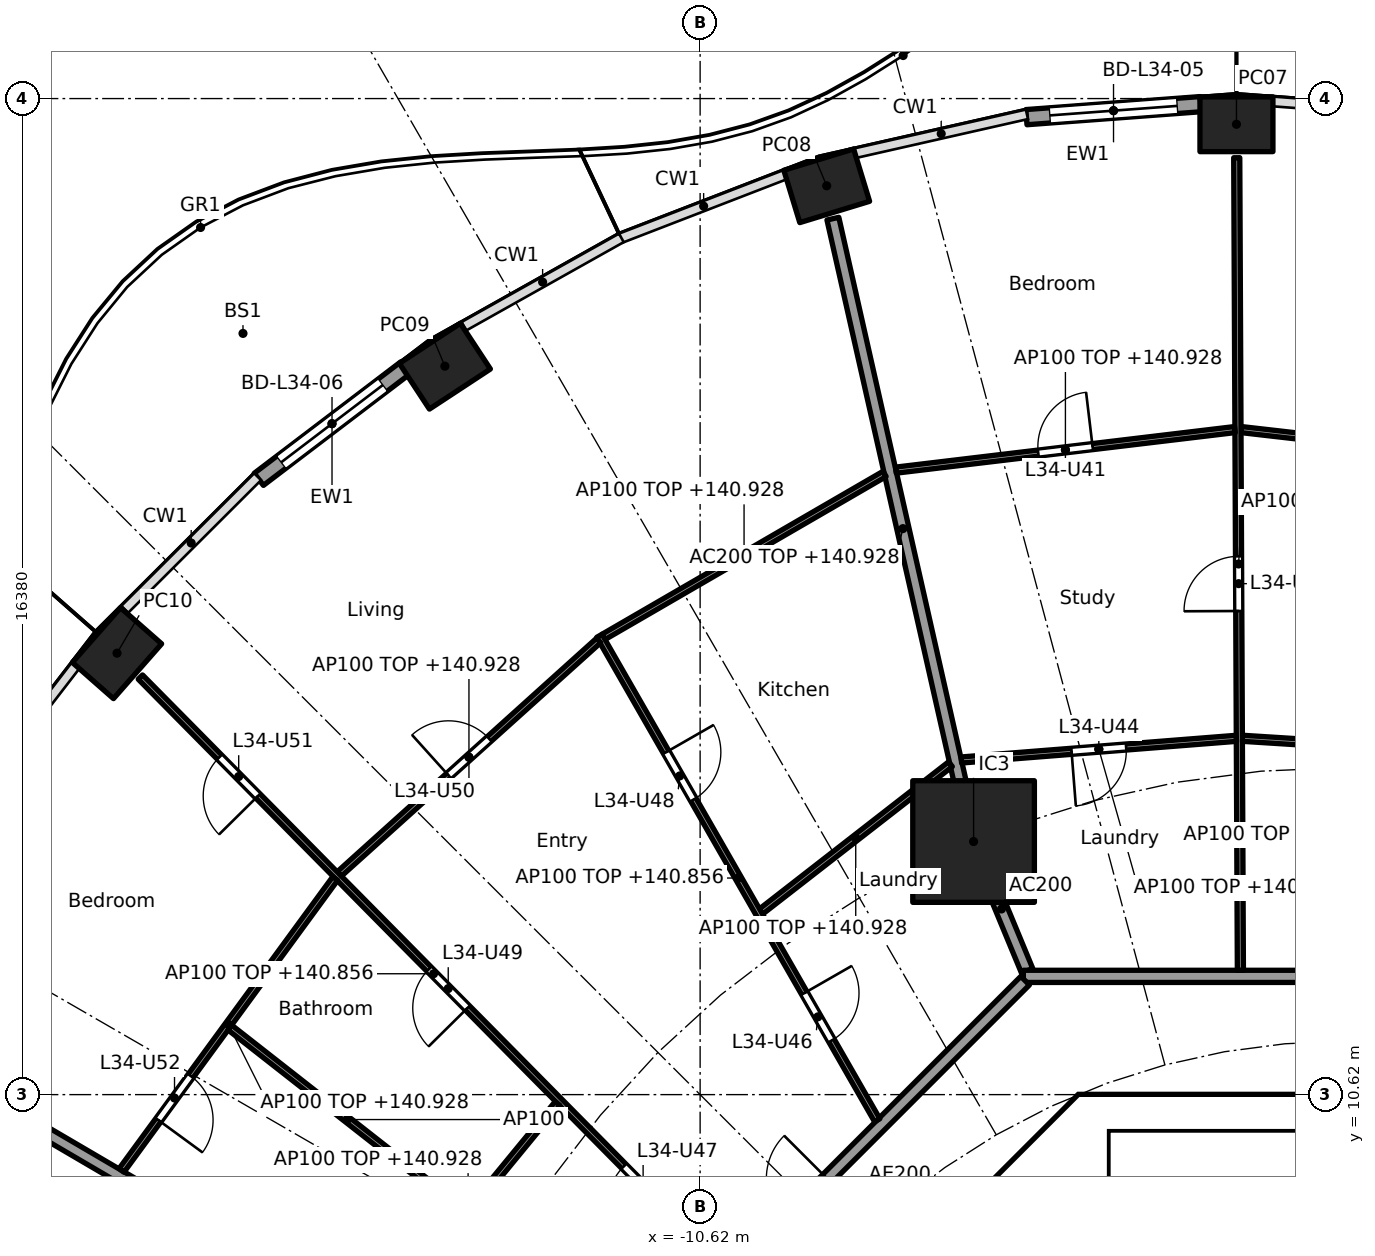
"""IFC4 building model, lengths in metres.
Left out: names, types, materials, properties, quantities, classifications, styles, units other than length and angle.
Written with IfcOpenShell. Run it as: python <this file> out.ifc"""

import sys

from ifc_helpers import new_model, si_unit, direction, frame, frame_2d, origin, origin_2d, place, context, subcontext, project, spatial, polyline, rectangle, hollow_rectangle, outline, extrude, element, fill, save


model = new_model("IFC4")
c1 = context("Model", 3, precision=1e-05, world=origin(), true_north=direction((0.0, 1.0)))
c2 = subcontext(c1, "Body", "Model", "MODEL_VIEW")
j1 = project(units=[si_unit("LENGTHUNIT", "METRE"), si_unit("PLANEANGLEUNIT", "RADIAN")], contexts=[c1])
p1 = place(None, origin())
s1 = spatial("IfcSite", under=j1, at=p1, CompositionType="ELEMENT")
p2 = place(p1, origin())
s2 = spatial("IfcBuilding", under=s1, at=p2, CompositionType="ELEMENT")
p3 = place(p2, frame((0.0, 0.0, 138.1)))
s3 = spatial("IfcBuildingStorey", under=s2, at=p3, CompositionType="ELEMENT", Elevation=138.1)
for number, where, z_axis, x_axis in (
    (1, (-1.8, 26.577, 0.0), (0.0, 0.0, 1.0), (-1.0, 0.0, 0.0)),
    (2, (-8.538, 25.565, 0.0), (0.0, 0.0, 1.0), (-0.957, -0.292, 0.0)),
    (3, (-14.817, 22.599, 0.0), (0.0, 0.0, 1.0), (-0.836, -0.549, 0.0)),
    (4, (-20.209, 17.88, 0.0), (0.0, 0.0, 1.0), (-0.66, -0.751, 0.0)),
):
    element("IfcColumn", number, at=place(p3, frame(where, z_axis=z_axis, x_axis=x_axis)), inside=s3, PredefinedType="COLUMN", context=c2, shape_type="SweptSolid", body=[
        extrude(hollow_rectangle(XDim=1.2, YDim=0.9, WallThickness=0.04, at=origin_2d()), origin(), (0.0, 0.0, 1.0), 3.7),
    ])
p4 = place(p3, frame((-6.123, 14.782, 0.0), z_axis=(0.0, 0.0, 1.0), x_axis=(1.0, 0.0, 0.0)))
e5 = element("IfcColumn", 5, at=p4, inside=s3, PredefinedType="COLUMN", context=c2, shape_type="SweptSolid", body=[
    extrude(rectangle(XDim=2.0, YDim=2.0, at=origin_2d()), origin(), (0.0, 0.0, 1.0), 3.7),
])
p5 = place(p3, frame((-5.254, 26.694, 0.0), z_axis=(0.0, 0.0, 1.0), x_axis=(0.997231697044, 0.074356858535, 0.0)))
e6 = element("IfcWall", 6, at=p5, inside=s3, PredefinedType="SOLIDWALL", context=c2, shape_type="SweptSolid", body=[
    extrude(rectangle(XDim=2.873, YDim=0.25, at=frame_2d((1.437, 0.0))), origin(), (0.0, 0.0, 1.0), 3.44),
])
p6 = place(p5, frame((0.386, 0.0, 0.0)))
e7 = element("IfcOpeningElement", 7, at=p6, cuts=e6, PredefinedType="OPENING", context=c2, shape_type="SweptSolid", body=[
    extrude(rectangle(XDim=2.1, YDim=2.4, at=frame_2d((1.05, 1.2))), frame((0.0, 0.135, 0.0), z_axis=(0.0, -1.0, 0.0), x_axis=(1.0, 0.0, 0.0)), (0.0, 0.0, 1.0), 0.27),
])
p7 = place(p3, frame((-17.878, 20.738, 0.0), z_axis=(0.0, 0.0, 1.0), x_axis=(0.796022231079, 0.605267385233, 0.0)))
e8 = element("IfcWall", 8, at=p7, inside=s3, PredefinedType="SOLIDWALL", context=c2, shape_type="SweptSolid", body=[
    extrude(rectangle(XDim=3.026, YDim=0.25, at=frame_2d((1.513, 0.0))), origin(), (0.0, 0.0, 1.0), 3.44),
])
p8 = place(p7, frame((0.463, 0.0, 0.0)))
e9 = element("IfcOpeningElement", 9, at=p8, cuts=e8, PredefinedType="OPENING", context=c2, shape_type="SweptSolid", body=[
    extrude(rectangle(XDim=2.1, YDim=2.4, at=frame_2d((1.05, 1.2))), frame((0.0, 0.135, 0.0), z_axis=(0.0, -1.0, 0.0), x_axis=(1.0, 0.0, 0.0)), (0.0, 0.0, 1.0), 0.27),
])
p9 = place(p3, frame((-4.613, 9.988, 0.0), z_axis=(0.0, 0.0, 1.0), x_axis=(-0.707106781187, -0.707106781187, 0.0)))
e10 = element("IfcWall", 10, at=p9, inside=s3, PredefinedType="SHEAR", context=c2, shape_type="SweptSolid", body=[
    extrude(rectangle(XDim=7.602, YDim=0.6, at=frame_2d((3.801, 0.0))), origin(), (0.0, 0.0, 1.0), 3.44),
])
p10 = place(p9, frame((0.351, 0.0, 0.0)))
e11 = element("IfcOpeningElement", 11, at=p10, cuts=e10, PredefinedType="OPENING", context=c2, shape_type="SweptSolid", body=[
    extrude(rectangle(XDim=1.1, YDim=2.1, at=frame_2d((0.55, 1.05))), frame((0.0, 0.31, 0.0), z_axis=(0.0, -1.0, 0.0), x_axis=(1.0, 0.0, 0.0)), (0.0, 0.0, 1.0), 0.62),
])
p11 = place(p3, origin())
e12 = element("IfcWall", 12, at=p11, inside=s3, PredefinedType="SHEAR", context=c2, shape_type="SweptSolid", body=[
    extrude(outline(polyline([(-4.152, 10.025), (-4.401, 9.776), (-4.825, 10.2), (-4.401, 10.625), (4.401, 10.625), (4.825, 10.2), (4.401, 9.776), (4.152, 10.025), (-4.152, 10.025)])), origin(), (0.0, 0.0, 1.0), 3.44),
])
p12 = place(p3, origin())
e13 = element("IfcWall", 13, at=p12, inside=s3, PredefinedType="SOLIDWALL", context=c2, shape_type="SweptSolid", body=[
    extrude(outline(polyline([(-3.9, 7.025), (-4.1, 7.025), (-4.1, 10.025), (-3.9, 10.025), (-3.9, 7.025)])), origin(), (0.0, 0.0, 1.0), 3.44),
])
p13 = place(p3, frame((-5.243, 12.657, 0.0), z_axis=(0.0, 0.0, 1.0), x_axis=(-0.38273085373, 0.923859888513, 0.0)))
e14 = element("IfcWall", 14, at=p13, inside=s3, PredefinedType="PARTITIONING", context=c2, shape_type="SweptSolid", body=[
    extrude(rectangle(XDim=2.199, YDim=0.2, at=frame_2d((1.1, 0.0))), origin(), (0.0, 0.0, 1.0), 3.44),
])
p14 = place(p3, frame((-6.134, 14.831, 0.0), z_axis=(0.0, 0.0, 1.0), x_axis=(-0.220337590808, 0.975423675167, 0.0)))
e15 = element("IfcWall", 15, at=p14, inside=s3, PredefinedType="PARTITIONING", context=c2, shape_type="SweptSolid", body=[
    extrude(rectangle(XDim=10.451, YDim=0.2, at=frame_2d((5.226, 0.0))), origin(), (0.0, 0.0, 1.0), 2.828),
])
p15 = place(p3, frame((-14.825, 6.148, 0.0), z_axis=(0.0, 0.0, 1.0), x_axis=(-0.862852031662, 0.505456597006, 0.0)))
e16 = element("IfcWall", 16, at=p15, inside=s3, PredefinedType="PARTITIONING", context=c2, shape_type="SweptSolid", body=[
    extrude(rectangle(XDim=10.487, YDim=0.2, at=frame_2d((5.244, 0.0))), origin(), (0.0, 0.0, 1.0), 2.828),
])
p16 = place(p3, frame((5.104, 12.565, 0.0), z_axis=(0.0, 0.0, 1.0), x_axis=(-1.0, 0.0, 0.0)))
e17 = element("IfcWall", 17, at=p16, inside=s3, PredefinedType="PARTITIONING", context=c2, shape_type="SweptSolid", body=[
    extrude(rectangle(XDim=10.409, YDim=0.2, at=frame_2d((5.205, 0.0))), origin(), (0.0, 0.0, 1.0), 3.44),
])
p17 = place(p3, frame((-5.275, 12.494, 0.0), z_axis=(0.0, 0.0, 1.0), x_axis=(-0.707106781187, -0.707106781187, 0.0)))
e18 = element("IfcWall", 18, at=p17, inside=s3, PredefinedType="PARTITIONING", context=c2, shape_type="SweptSolid", body=[
    extrude(rectangle(XDim=10.209, YDim=0.2, at=frame_2d((5.104, 0.0))), origin(), (0.0, 0.0, 1.0), 3.44),
])
p18 = place(p17, frame((4.604, 0.0, 0.0)))
e19 = element("IfcOpeningElement", 19, at=p18, cuts=e18, PredefinedType="OPENING", context=c2, shape_type="SweptSolid", body=[
    extrude(rectangle(XDim=1.0, YDim=2.1, at=frame_2d((0.5, 1.05))), frame((0.0, 0.11, 0.0), z_axis=(0.0, -1.0, 0.0), x_axis=(1.0, 0.0, 0.0)), (0.0, 0.0, 1.0), 0.22),
])
p19 = place(p3, frame((2.685, 16.202, 0.0), z_axis=(0.0, 0.0, 1.0), x_axis=(-0.998000808042, 0.063201164138, 0.0)))
e20 = element("IfcWall", 20, at=p19, inside=s3, PredefinedType="PARTITIONING", context=c2, shape_type="SweptSolid", body=[
    extrude(rectangle(XDim=4.396, YDim=0.1, at=frame_2d((2.198, 0.0))), origin(), (0.0, 0.0, 1.0), 2.828),
])
p20 = place(p19, frame((1.773, 0.0, 0.0)))
e21 = element("IfcOpeningElement", 21, at=p20, cuts=e20, PredefinedType="OPENING", context=c2, shape_type="SweptSolid", body=[
    extrude(rectangle(XDim=0.9, YDim=2.1, at=frame_2d((0.45, 1.05))), frame((0.0, 0.06, 0.0), z_axis=(0.0, -1.0, 0.0), x_axis=(1.0, 0.0, 0.0)), (0.0, 0.0, 1.0), 0.12),
])
p21 = place(p3, frame((3.851, 20.919, 0.0), z_axis=(0.0, 0.0, 1.0), x_axis=(-0.993519908136, 0.11365822512, 0.0)))
e22 = element("IfcWall", 22, at=p21, inside=s3, PredefinedType="PARTITIONING", context=c2, shape_type="SweptSolid", body=[
    extrude(rectangle(XDim=5.613, YDim=0.1, at=frame_2d((2.806, 0.0))), origin(), (0.0, 0.0, 1.0), 2.828),
])
p22 = place(p3, frame((-1.735, 12.665, 0.0), z_axis=(0.0, 0.0, 1.0), x_axis=(-0.004494500855, 0.99998989968, 0.0)))
e23 = element("IfcWall", 23, at=p22, inside=s3, PredefinedType="PARTITIONING", context=c2, shape_type="SweptSolid", body=[
    extrude(rectangle(XDim=13.363, YDim=0.1, at=frame_2d((6.681, 0.0))), origin(), (0.0, 0.0, 1.0), 2.756),
])
p23 = place(p22, frame((5.908, 0.0, 0.0)))
e24 = element("IfcOpeningElement", 24, at=p23, cuts=e23, PredefinedType="OPENING", context=c2, shape_type="SweptSolid", body=[
    extrude(rectangle(XDim=0.9, YDim=2.1, at=frame_2d((0.45, 1.05))), frame((0.0, 0.06, 0.0), z_axis=(0.0, -1.0, 0.0), x_axis=(1.0, 0.0, 0.0)), (0.0, 0.0, 1.0), 0.12),
])
p24 = place(p3, frame((-1.802, 16.479, 0.0), z_axis=(0.0, 0.0, 1.0), x_axis=(-0.996907698294, -0.078581429625, 0.0)))
e25 = element("IfcWall", 25, at=p24, inside=s3, PredefinedType="PARTITIONING", context=c2, shape_type="SweptSolid", body=[
    extrude(rectangle(XDim=4.536, YDim=0.1, at=frame_2d((2.268, 0.0))), origin(), (0.0, 0.0, 1.0), 2.828),
])
p25 = place(p24, frame((1.818, 0.0, 0.0)))
e26 = element("IfcOpeningElement", 26, at=p25, cuts=e25, PredefinedType="OPENING", context=c2, shape_type="SweptSolid", body=[
    extrude(rectangle(XDim=0.9, YDim=2.1, at=frame_2d((0.45, 1.05))), frame((0.0, 0.06, 0.0), z_axis=(0.0, -1.0, 0.0), x_axis=(1.0, 0.0, 0.0)), (0.0, 0.0, 1.0), 0.12),
])
p26 = place(p3, frame((-1.825, 21.557, 0.0), z_axis=(0.0, 0.0, 1.0), x_axis=(-0.992915053711, -0.11882632753, 0.0)))
e27 = element("IfcWall", 27, at=p26, inside=s3, PredefinedType="PARTITIONING", context=c2, shape_type="SweptSolid", body=[
    extrude(rectangle(XDim=5.615, YDim=0.1, at=frame_2d((2.808, 0.0))), origin(), (0.0, 0.0, 1.0), 2.828),
])
p27 = place(p26, frame((2.358, 0.0, 0.0)))
e28 = element("IfcOpeningElement", 28, at=p27, cuts=e27, PredefinedType="OPENING", context=c2, shape_type="SweptSolid", body=[
    extrude(rectangle(XDim=0.9, YDim=2.1, at=frame_2d((0.45, 1.05))), frame((0.0, 0.06, 0.0), z_axis=(0.0, -1.0, 0.0), x_axis=(1.0, 0.0, 0.0)), (0.0, 0.0, 1.0), 0.12),
])
p28 = place(p3, frame((-6.503, 16.054, 0.0), z_axis=(0.0, 0.0, 1.0), x_axis=(-0.789428807693, -0.613842127574, 0.0)))
e29 = element("IfcWall", 29, at=p28, inside=s3, PredefinedType="PARTITIONING", context=c2, shape_type="SweptSolid", body=[
    extrude(rectangle(XDim=3.948, YDim=0.1, at=frame_2d((1.974, 0.0))), origin(), (0.0, 0.0, 1.0), 2.828),
])
p29 = place(p3, frame((-7.586, 20.827, 0.0), z_axis=(0.0, 0.0, 1.0), x_axis=(-0.865093450578, -0.501610727325, 0.0)))
e30 = element("IfcWall", 30, at=p29, inside=s3, PredefinedType="PARTITIONING", context=c2, shape_type="SweptSolid", body=[
    extrude(rectangle(XDim=5.343, YDim=0.1, at=frame_2d((2.671, 0.0))), origin(), (0.0, 0.0, 1.0), 2.828),
])
p30 = place(p3, frame((-7.708, 10.198, 0.0), z_axis=(0.0, 0.0, 1.0), x_axis=(-0.497449462689, 0.867492957937, 0.0)))
e31 = element("IfcWall", 31, at=p30, inside=s3, PredefinedType="PARTITIONING", context=c2, shape_type="SweptSolid", body=[
    extrude(rectangle(XDim=9.185, YDim=0.1, at=frame_2d((4.592, 0.0))), origin(), (0.0, 0.0, 1.0), 2.756),
])
p31 = place(p30, frame((1.511, 0.0, 0.0)))
e32 = element("IfcOpeningElement", 32, at=p31, cuts=e31, PredefinedType="OPENING", context=c2, shape_type="SweptSolid", body=[
    extrude(rectangle(XDim=0.9, YDim=2.1, at=frame_2d((0.45, 1.05))), frame((0.0, 0.06, 0.0), z_axis=(0.0, -1.0, 0.0), x_axis=(1.0, 0.0, 0.0)), (0.0, 0.0, 1.0), 0.12),
])
p32 = place(p30, frame((6.078, 0.0, 0.0)))
e33 = element("IfcOpeningElement", 33, at=p32, cuts=e31, PredefinedType="OPENING", context=c2, shape_type="SweptSolid", body=[
    extrude(rectangle(XDim=0.9, YDim=2.1, at=frame_2d((0.45, 1.05))), frame((0.0, 0.06, 0.0), z_axis=(0.0, -1.0, 0.0), x_axis=(1.0, 0.0, 0.0)), (0.0, 0.0, 1.0), 0.12),
])
p33 = place(p3, frame((-12.289, 18.089, 0.0), z_axis=(0.0, 0.0, 1.0), x_axis=(-0.743146066164, -0.669129228435, 0.0)))
e34 = element("IfcWall", 34, at=p33, inside=s3, PredefinedType="PARTITIONING", context=c2, shape_type="SweptSolid", body=[
    extrude(rectangle(XDim=5.739, YDim=0.1, at=frame_2d((2.87, 0.0))), origin(), (0.0, 0.0, 1.0), 2.828),
])
p34 = place(p33, frame((2.42, 0.0, 0.0)))
e35 = element("IfcOpeningElement", 35, at=p34, cuts=e34, PredefinedType="OPENING", context=c2, shape_type="SweptSolid", body=[
    extrude(rectangle(XDim=0.9, YDim=2.1, at=frame_2d((0.45, 1.05))), frame((0.0, 0.06, 0.0), z_axis=(0.0, -1.0, 0.0), x_axis=(1.0, 0.0, 0.0)), (0.0, 0.0, 1.0), 0.12),
])
p35 = place(p3, frame((-10.182, 7.729, 0.0), z_axis=(0.0, 0.0, 1.0), x_axis=(-0.702930219229, 0.7112588185, 0.0)))
e36 = element("IfcWall", 36, at=p35, inside=s3, PredefinedType="PARTITIONING", context=c2, shape_type="SweptSolid", body=[
    extrude(rectangle(XDim=13.719, YDim=0.1, at=frame_2d((6.859, 0.0))), origin(), (0.0, 0.0, 1.0), 2.756),
])
p36 = place(p35, frame((1.507, 0.0, 0.0)))
e37 = element("IfcOpeningElement", 37, at=p36, cuts=e36, PredefinedType="OPENING", context=c2, shape_type="SweptSolid", body=[
    extrude(rectangle(XDim=0.9, YDim=2.1, at=frame_2d((0.45, 1.05))), frame((0.0, 0.06, 0.0), z_axis=(0.0, -1.0, 0.0), x_axis=(1.0, 0.0, 0.0)), (0.0, 0.0, 1.0), 0.12),
])
p37 = place(p35, frame((6.067, 0.0, 0.0)))
e38 = element("IfcOpeningElement", 38, at=p37, cuts=e36, PredefinedType="OPENING", context=c2, shape_type="SweptSolid", body=[
    extrude(rectangle(XDim=0.9, YDim=2.1, at=frame_2d((0.45, 1.05))), frame((0.0, 0.06, 0.0), z_axis=(0.0, -1.0, 0.0), x_axis=(1.0, 0.0, 0.0)), (0.0, 0.0, 1.0), 0.12),
])
p38 = place(p35, frame((10.969, 0.0, 0.0)))
e39 = element("IfcOpeningElement", 39, at=p38, cuts=e36, PredefinedType="OPENING", context=c2, shape_type="SweptSolid", body=[
    extrude(rectangle(XDim=0.9, YDim=2.1, at=frame_2d((0.45, 1.05))), frame((0.0, 0.06, 0.0), z_axis=(0.0, -1.0, 0.0), x_axis=(1.0, 0.0, 0.0)), (0.0, 0.0, 1.0), 0.12),
])
p39 = place(p3, frame((-12.965, 10.475, 0.0), z_axis=(0.0, 0.0, 1.0), x_axis=(-0.634943961338, -0.772558195841, 0.0)))
e40 = element("IfcWall", 40, at=p39, inside=s3, PredefinedType="PARTITIONING", context=c2, shape_type="SweptSolid", body=[
    extrude(rectangle(XDim=4.632, YDim=0.1, at=frame_2d((2.316, 0.0))), origin(), (0.0, 0.0, 1.0), 2.828),
])
p40 = place(p3, frame((-16.621, 14.174, 0.0), z_axis=(0.0, 0.0, 1.0), x_axis=(-0.590674917338, -0.806909624449, 0.0)))
e41 = element("IfcWall", 41, at=p40, inside=s3, PredefinedType="PARTITIONING", context=c2, shape_type="SweptSolid", body=[
    extrude(rectangle(XDim=5.949, YDim=0.1, at=frame_2d((2.975, 0.0))), origin(), (0.0, 0.0, 1.0), 2.828),
])
p41 = place(p40, frame((4.024, 0.0, 0.0)))
e42 = element("IfcOpeningElement", 42, at=p41, cuts=e41, PredefinedType="OPENING", context=c2, shape_type="SweptSolid", body=[
    extrude(rectangle(XDim=0.9, YDim=2.1, at=frame_2d((0.45, 1.05))), frame((0.0, 0.06, 0.0), z_axis=(0.0, -1.0, 0.0), x_axis=(1.0, 0.0, 0.0)), (0.0, 0.0, 1.0), 0.12),
])
p42 = place(p3, frame((-14.491, 8.697, 0.0), z_axis=(0.0, 0.0, 1.0), x_axis=(-0.787139479951, 0.616775031193, 0.0)))
e43 = element("IfcWall", 43, at=p42, inside=s3, PredefinedType="PARTITIONING", context=c2, shape_type="SweptSolid", body=[
    extrude(rectangle(XDim=4.907, YDim=0.1, at=frame_2d((2.453, 0.0))), origin(), (0.0, 0.0, 1.0), 3.44),
])
p43 = place(p6, origin())
e44 = element("IfcDoor", 44, at=p43, inside=s3, OperationType="SLIDING_TO_LEFT", PredefinedType="DOOR", context=c2, shape_type="SweptSolid", body=[
    extrude(rectangle(XDim=2.1, YDim=2.4, at=frame_2d((1.05, 1.2))), frame((0.0, 0.025, 0.0), z_axis=(0.0, -1.0, 0.0), x_axis=(1.0, 0.0, 0.0)), (0.0, 0.0, 1.0), 0.05),
])
fill(e7, e44)
p44 = place(p8, origin())
e45 = element("IfcDoor", 45, at=p44, inside=s3, OperationType="SLIDING_TO_LEFT", PredefinedType="DOOR", context=c2, shape_type="SweptSolid", body=[
    extrude(rectangle(XDim=2.1, YDim=2.4, at=frame_2d((1.05, 1.2))), frame((0.0, 0.025, 0.0), z_axis=(0.0, -1.0, 0.0), x_axis=(1.0, 0.0, 0.0)), (0.0, 0.0, 1.0), 0.05),
])
fill(e9, e45)
p45 = place(p10, origin())
e46 = element("IfcDoor", 46, at=p45, inside=s3, OperationType="SINGLE_SWING_RIGHT", PredefinedType="DOOR", context=c2, shape_type="SweptSolid", body=[
    extrude(rectangle(XDim=1.1, YDim=2.1, at=frame_2d((0.55, 1.05))), frame((0.0, 0.025, 0.0), z_axis=(0.0, -1.0, 0.0), x_axis=(1.0, 0.0, 0.0)), (0.0, 0.0, 1.0), 0.05),
])
fill(e11, e46)
p46 = place(p23, origin())
e47 = element("IfcDoor", 47, at=p46, inside=s3, OperationType="SINGLE_SWING_LEFT", PredefinedType="DOOR", context=c2, shape_type="SweptSolid", body=[
    extrude(rectangle(XDim=0.9, YDim=2.1, at=frame_2d((0.45, 1.05))), frame((0.0, 0.025, 0.0), z_axis=(0.0, -1.0, 0.0), x_axis=(1.0, 0.0, 0.0)), (0.0, 0.0, 1.0), 0.05),
])
fill(e24, e47)
p47 = place(p27, frame((0.9, 0.0, 0.0), x_axis=(-1.0, 0.0, 0.0)))
e48 = element("IfcDoor", 48, at=p47, inside=s3, OperationType="SINGLE_SWING_RIGHT", PredefinedType="DOOR", context=c2, shape_type="SweptSolid", body=[
    extrude(rectangle(XDim=0.9, YDim=2.1, at=frame_2d((0.45, 1.05))), frame((0.0, 0.025, 0.0), z_axis=(0.0, -1.0, 0.0), x_axis=(1.0, 0.0, 0.0)), (0.0, 0.0, 1.0), 0.05),
])
fill(e28, e48)
p48 = place(p25, origin())
e49 = element("IfcDoor", 49, at=p48, inside=s3, OperationType="SINGLE_SWING_RIGHT", PredefinedType="DOOR", context=c2, shape_type="SweptSolid", body=[
    extrude(rectangle(XDim=0.9, YDim=2.1, at=frame_2d((0.45, 1.05))), frame((0.0, 0.025, 0.0), z_axis=(0.0, -1.0, 0.0), x_axis=(1.0, 0.0, 0.0)), (0.0, 0.0, 1.0), 0.05),
])
fill(e26, e49)
p49 = place(p31, frame((0.9, 0.0, 0.0), x_axis=(-1.0, 0.0, 0.0)))
e50 = element("IfcDoor", 50, at=p49, inside=s3, OperationType="SINGLE_SWING_LEFT", PredefinedType="DOOR", context=c2, shape_type="SweptSolid", body=[
    extrude(rectangle(XDim=0.9, YDim=2.1, at=frame_2d((0.45, 1.05))), frame((0.0, 0.025, 0.0), z_axis=(0.0, -1.0, 0.0), x_axis=(1.0, 0.0, 0.0)), (0.0, 0.0, 1.0), 0.05),
])
fill(e32, e50)
p50 = place(p36, origin())
e51 = element("IfcDoor", 51, at=p50, inside=s3, OperationType="SINGLE_SWING_LEFT", PredefinedType="DOOR", context=c2, shape_type="SweptSolid", body=[
    extrude(rectangle(XDim=0.9, YDim=2.1, at=frame_2d((0.45, 1.05))), frame((0.0, 0.025, 0.0), z_axis=(0.0, -1.0, 0.0), x_axis=(1.0, 0.0, 0.0)), (0.0, 0.0, 1.0), 0.05),
])
fill(e37, e51)
p51 = place(p32, frame((0.9, 0.0, 0.0), x_axis=(-1.0, 0.0, 0.0)))
e52 = element("IfcDoor", 52, at=p51, inside=s3, OperationType="SINGLE_SWING_LEFT", PredefinedType="DOOR", context=c2, shape_type="SweptSolid", body=[
    extrude(rectangle(XDim=0.9, YDim=2.1, at=frame_2d((0.45, 1.05))), frame((0.0, 0.025, 0.0), z_axis=(0.0, -1.0, 0.0), x_axis=(1.0, 0.0, 0.0)), (0.0, 0.0, 1.0), 0.05),
])
fill(e33, e52)
p52 = place(p37, origin())
e53 = element("IfcDoor", 53, at=p52, inside=s3, OperationType="SINGLE_SWING_LEFT", PredefinedType="DOOR", context=c2, shape_type="SweptSolid", body=[
    extrude(rectangle(XDim=0.9, YDim=2.1, at=frame_2d((0.45, 1.05))), frame((0.0, 0.025, 0.0), z_axis=(0.0, -1.0, 0.0), x_axis=(1.0, 0.0, 0.0)), (0.0, 0.0, 1.0), 0.05),
])
fill(e38, e53)
p53 = place(p34, frame((0.9, 0.0, 0.0), x_axis=(-1.0, 0.0, 0.0)))
e54 = element("IfcDoor", 54, at=p53, inside=s3, OperationType="SINGLE_SWING_LEFT", PredefinedType="DOOR", context=c2, shape_type="SweptSolid", body=[
    extrude(rectangle(XDim=0.9, YDim=2.1, at=frame_2d((0.45, 1.05))), frame((0.0, 0.025, 0.0), z_axis=(0.0, -1.0, 0.0), x_axis=(1.0, 0.0, 0.0)), (0.0, 0.0, 1.0), 0.05),
])
fill(e35, e54)
p54 = place(p38, origin())
e55 = element("IfcDoor", 55, at=p54, inside=s3, OperationType="SINGLE_SWING_LEFT", PredefinedType="DOOR", context=c2, shape_type="SweptSolid", body=[
    extrude(rectangle(XDim=0.9, YDim=2.1, at=frame_2d((0.45, 1.05))), frame((0.0, 0.025, 0.0), z_axis=(0.0, -1.0, 0.0), x_axis=(1.0, 0.0, 0.0)), (0.0, 0.0, 1.0), 0.05),
])
fill(e39, e55)
p55 = place(p41, origin())
e56 = element("IfcDoor", 56, at=p55, inside=s3, OperationType="SINGLE_SWING_RIGHT", PredefinedType="DOOR", context=c2, shape_type="SweptSolid", body=[
    extrude(rectangle(XDim=0.9, YDim=2.1, at=frame_2d((0.45, 1.05))), frame((0.0, 0.025, 0.0), z_axis=(0.0, -1.0, 0.0), x_axis=(1.0, 0.0, 0.0)), (0.0, 0.0, 1.0), 0.05),
])
fill(e42, e56)
save(model, sys.argv[1])
